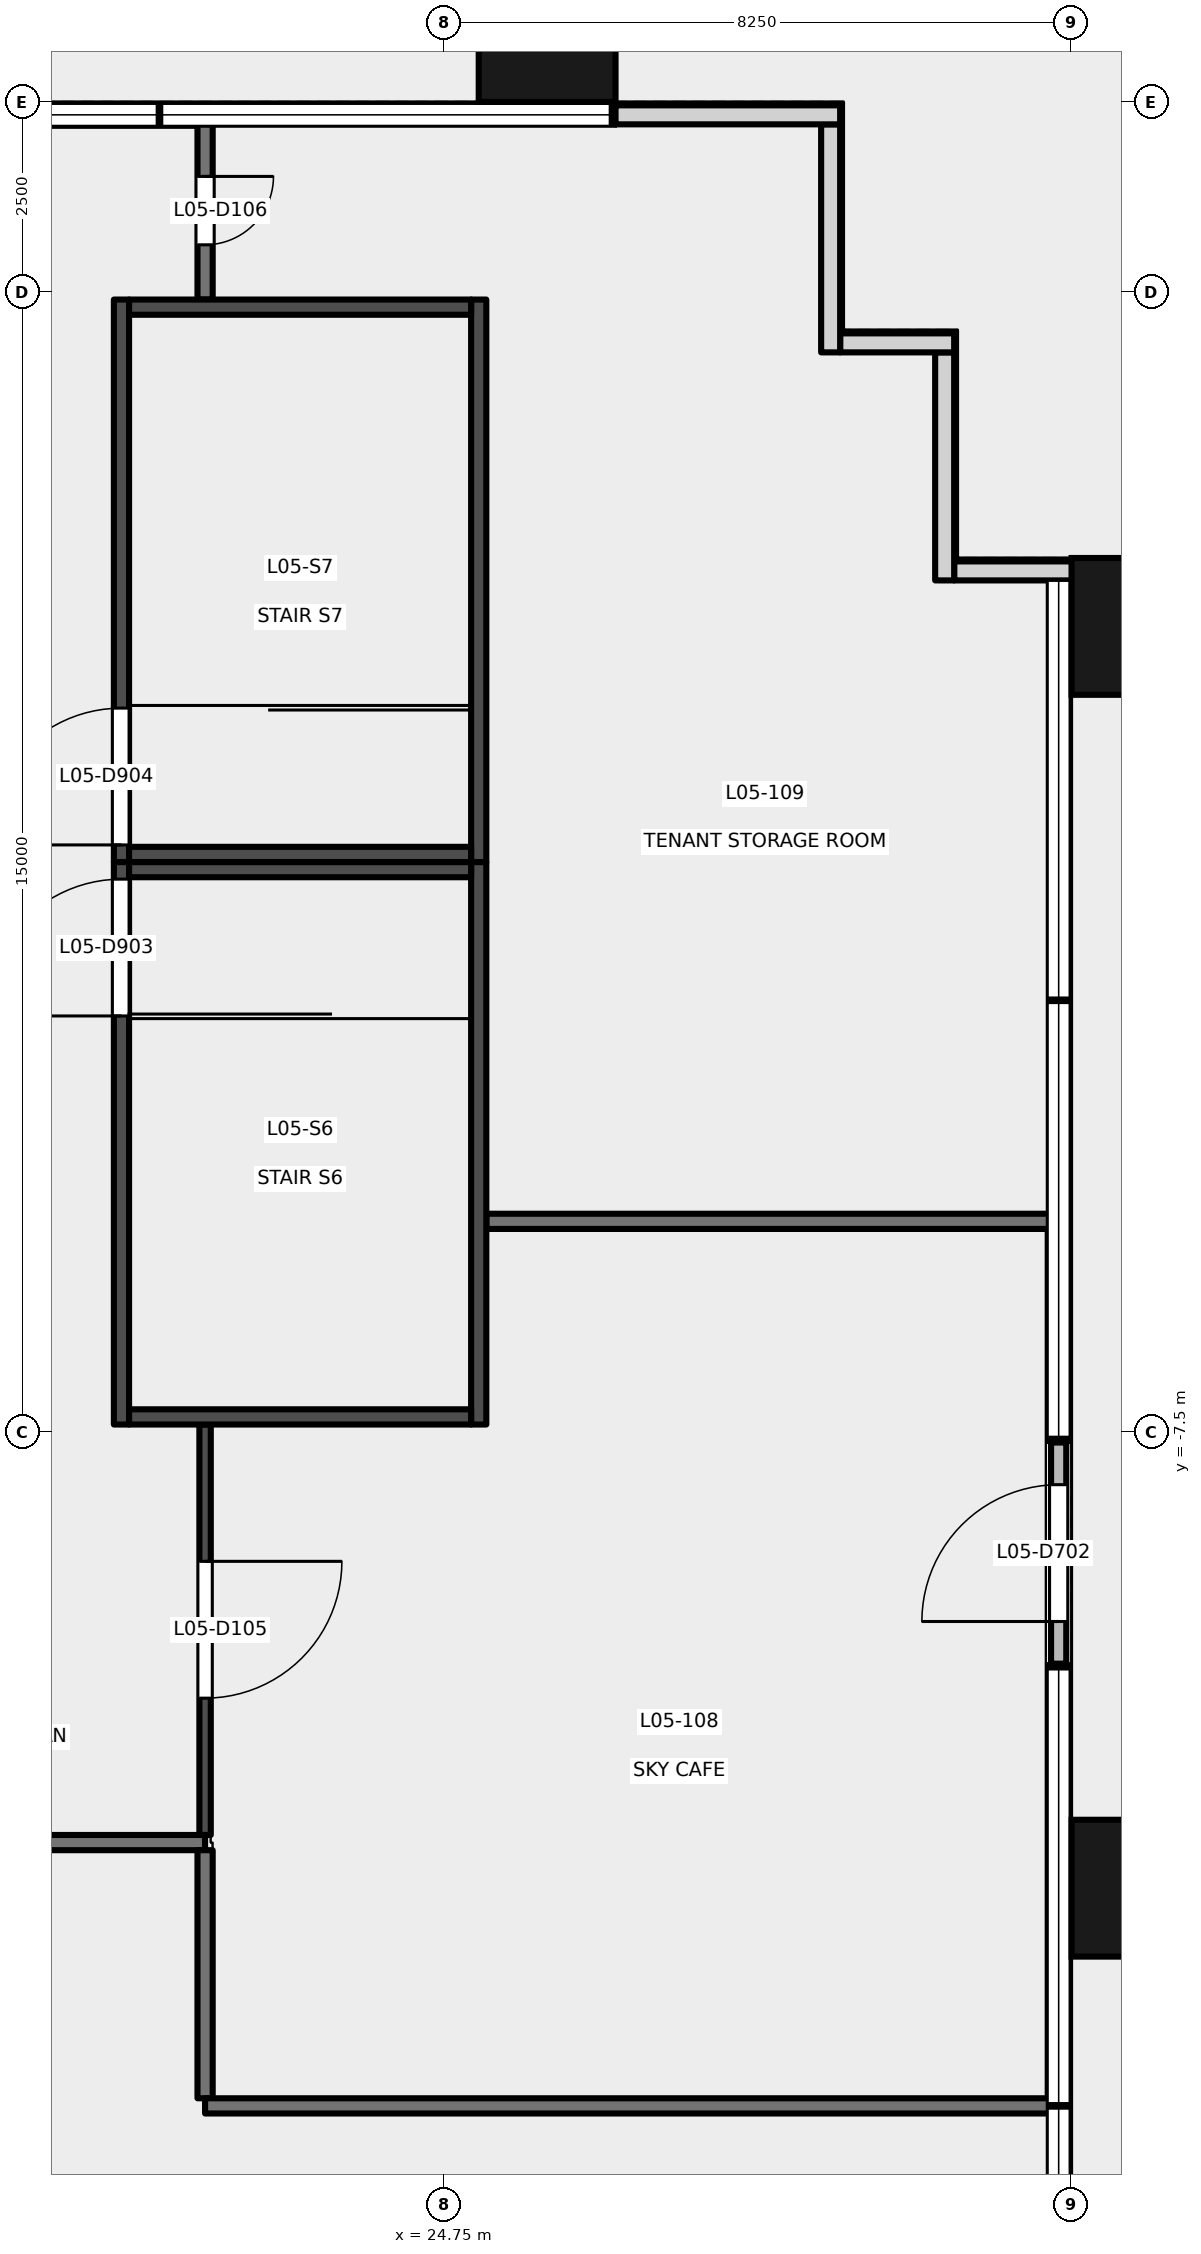
"""IFC4 building model, lengths in metres.
Left out: names, types, materials, properties, quantities, classifications, styles, units other than length and angle.
Written with IfcOpenShell. Run it as: python <this file> out.ifc"""

import sys

from ifc_helpers import new_model, si_unit, direction, frame, frame_2d, origin, origin_2d, place, context, subcontext, project, spatial, rectangle, extrude, element, fill, save


model = new_model("IFC4")
c1 = context("Model", 3, precision=1e-05, world=origin(), true_north=direction((0.0, 1.0)))
c2 = subcontext(c1, "Body", "Model", "MODEL_VIEW")
j1 = project(units=[si_unit("LENGTHUNIT", "METRE"), si_unit("PLANEANGLEUNIT", "RADIAN")], contexts=[c1])
p1 = place(None, origin())
s1 = spatial("IfcSite", under=j1, at=p1, CompositionType="ELEMENT")
p2 = place(p1, origin())
s2 = spatial("IfcBuilding", under=s1, at=p2, CompositionType="ELEMENT")
p3 = place(p2, frame((0.0, 0.0, 27.0)))
s3 = spatial("IfcBuildingStorey", under=s2, at=p3, CompositionType="ELEMENT", Elevation=27.0)
for number, where, z_axis, x_axis in (
    (1, (33.9, -13.5, -0.2), (0.0, 0.0, 1.0), (0.0, 1.0, 0.0)),
    (2, (33.9, 3.1, -0.2), (0.0, 0.0, 1.0), (0.0, 1.0, 0.0)),
    (3, (26.1, 10.9, -0.2), (0.0, 0.0, 1.0), (1.0, 0.0, 0.0)),
):
    element("IfcColumn", number, at=place(p3, frame(where, z_axis=z_axis, x_axis=x_axis)), inside=s3, PredefinedType="COLUMN", context=c2, shape_type="SweptSolid", body=[
        extrude(rectangle(XDim=1.8, YDim=1.8, at=origin_2d()), origin(), (0.0, 0.0, 1.0), 5.4),
    ])
p4 = place(p3, frame((32.83, -10.546, 0.0), z_axis=(0.0, 0.0, 1.0), x_axis=(0.0, 1.0, 0.0)))
e4 = element("IfcWall", 4, at=p4, inside=s3, PredefinedType="SOLIDWALL", context=c2, shape_type="SweptSolid", body=[
    extrude(rectangle(XDim=2.909, YDim=0.2, at=frame_2d((1.455, 0.0))), origin(), (0.0, 0.0, 1.0), 4.1),
])
p5 = place(p4, frame((0.554, 0.0, 0.0)))
e5 = element("IfcOpeningElement", 5, at=p5, cuts=e4, PredefinedType="OPENING", context=c2, shape_type="SweptSolid", body=[
    extrude(rectangle(XDim=1.8, YDim=2.4, at=frame_2d((0.9, 1.2))), frame((0.0, 0.111, 0.0), z_axis=(0.0, -1.0, 0.0), x_axis=(1.0, 0.0, 0.0)), (0.0, 0.0, 1.0), 0.221),
])
p6 = place(p3, frame((33.005, 3.83, 0.0), z_axis=(0.0, 0.0, 1.0), x_axis=(-1.0, 0.0, 0.0)))
e6 = element("IfcWall", 6, at=p6, inside=s3, PredefinedType="SOLIDWALL", context=c2, shape_type="SweptSolid", body=[
    extrude(rectangle(XDim=1.55, YDim=0.25, at=frame_2d((0.775, 0.0))), origin(), (0.0, 0.0, 1.0), 5.2),
])
p7 = place(p3, frame((31.33, 3.705, 0.0), z_axis=(0.0, 0.0, 1.0), x_axis=(0.0, 1.0, 0.0)))
e7 = element("IfcWall", 7, at=p7, inside=s3, PredefinedType="SOLIDWALL", context=c2, shape_type="SweptSolid", body=[
    extrude(rectangle(XDim=3.0, YDim=0.25, at=frame_2d((1.5, 0.0))), origin(), (0.0, 0.0, 1.0), 5.2),
])
p8 = place(p3, frame((31.455, 6.83, 0.0), z_axis=(0.0, 0.0, 1.0), x_axis=(-1.0, 0.0, 0.0)))
e8 = element("IfcWall", 8, at=p8, inside=s3, PredefinedType="SOLIDWALL", context=c2, shape_type="SweptSolid", body=[
    extrude(rectangle(XDim=1.5, YDim=0.25, at=frame_2d((0.75, 0.0))), origin(), (0.0, 0.0, 1.0), 5.2),
])
p9 = place(p3, frame((29.83, 6.705, 0.0), z_axis=(0.0, 0.0, 1.0), x_axis=(0.0, 1.0, 0.0)))
e9 = element("IfcWall", 9, at=p9, inside=s3, PredefinedType="SOLIDWALL", context=c2, shape_type="SweptSolid", body=[
    extrude(rectangle(XDim=3.0, YDim=0.25, at=frame_2d((1.5, 0.0))), origin(), (0.0, 0.0, 1.0), 5.2),
])
p10 = place(p3, frame((29.955, 9.83, 0.0), z_axis=(0.0, 0.0, 1.0), x_axis=(-1.0, 0.0, 0.0)))
e10 = element("IfcWall", 10, at=p10, inside=s3, PredefinedType="SOLIDWALL", context=c2, shape_type="SweptSolid", body=[
    extrude(rectangle(XDim=2.955, YDim=0.25, at=frame_2d((1.478, 0.0))), origin(), (0.0, 0.0, 1.0), 5.2),
])
p11 = place(p3, frame((20.5, -7.4, -0.2), z_axis=(0.0, 0.0, 1.0), x_axis=(0.0, 1.0, 0.0)))
e11 = element("IfcWall", 11, at=p11, inside=s3, PredefinedType="SHEAR", context=c2, shape_type="SweptSolid", body=[
    extrude(rectangle(XDim=7.4, YDim=0.2, at=frame_2d((3.7, 0.0))), origin(), (0.0, 0.0, 1.0), 5.4),
])
p12 = place(p11, frame((5.375, 0.0, 0.2)))
e12 = element("IfcOpeningElement", 12, at=p12, cuts=e11, PredefinedType="OPENING", context=c2, shape_type="SweptSolid", body=[
    extrude(rectangle(XDim=1.8, YDim=2.1, at=frame_2d((0.9, 1.05))), frame((0.0, 0.111, 0.0), z_axis=(0.0, -1.0, 0.0), x_axis=(1.0, 0.0, 0.0)), (0.0, 0.0, 1.0), 0.221),
])
p13 = place(p3, frame((25.2, -7.4, -0.2), z_axis=(0.0, 0.0, 1.0), x_axis=(0.0, 1.0, 0.0)))
e13 = element("IfcWall", 13, at=p13, inside=s3, PredefinedType="SHEAR", context=c2, shape_type="SweptSolid", body=[
    extrude(rectangle(XDim=7.4, YDim=0.2, at=frame_2d((3.7, 0.0))), origin(), (0.0, 0.0, 1.0), 5.4),
])
for number, where, z_axis, x_axis in (
    (14, (20.6, -0.1, -0.2), (0.0, 0.0, 1.0), (1.0, 0.0, 0.0)),
    (15, (20.6, -7.3, -0.2), (0.0, 0.0, 1.0), (1.0, 0.0, 0.0)),
):
    element("IfcWall", number, at=place(p3, frame(where, z_axis=z_axis, x_axis=x_axis)), inside=s3, PredefinedType="SHEAR", context=c2, shape_type="SweptSolid", body=[
        extrude(rectangle(XDim=4.5, YDim=0.2, at=frame_2d((2.25, 0.0))), origin(), (0.0, 0.0, 1.0), 5.4),
    ])
p14 = place(p3, frame((20.5, 0.0, -0.2), z_axis=(0.0, 0.0, 1.0), x_axis=(0.0, 1.0, 0.0)))
e16 = element("IfcWall", 16, at=p14, inside=s3, PredefinedType="SHEAR", context=c2, shape_type="SweptSolid", body=[
    extrude(rectangle(XDim=7.4, YDim=0.2, at=frame_2d((3.7, 0.0))), origin(), (0.0, 0.0, 1.0), 5.4),
])
p15 = place(p14, frame((0.225, 0.0, 0.2)))
e17 = element("IfcOpeningElement", 17, at=p15, cuts=e16, PredefinedType="OPENING", context=c2, shape_type="SweptSolid", body=[
    extrude(rectangle(XDim=1.8, YDim=2.1, at=frame_2d((0.9, 1.05))), frame((0.0, 0.111, 0.0), z_axis=(0.0, -1.0, 0.0), x_axis=(1.0, 0.0, 0.0)), (0.0, 0.0, 1.0), 0.221),
])
p16 = place(p3, frame((25.2, 0.0, -0.2), z_axis=(0.0, 0.0, 1.0), x_axis=(0.0, 1.0, 0.0)))
e18 = element("IfcWall", 18, at=p16, inside=s3, PredefinedType="SHEAR", context=c2, shape_type="SweptSolid", body=[
    extrude(rectangle(XDim=7.4, YDim=0.2, at=frame_2d((3.7, 0.0))), origin(), (0.0, 0.0, 1.0), 5.4),
])
for number, where, z_axis, x_axis in (
    (19, (20.6, 7.3, -0.2), (0.0, 0.0, 1.0), (1.0, 0.0, 0.0)),
    (20, (20.6, 0.1, -0.2), (0.0, 0.0, 1.0), (1.0, 0.0, 0.0)),
):
    element("IfcWall", number, at=place(p3, frame(where, z_axis=z_axis, x_axis=x_axis)), inside=s3, PredefinedType="SHEAR", context=c2, shape_type="SweptSolid", body=[
        extrude(rectangle(XDim=4.5, YDim=0.2, at=frame_2d((2.25, 0.0))), origin(), (0.0, 0.0, 1.0), 5.4),
    ])
p17 = place(p3, frame((21.6, -12.9, 0.0), z_axis=(0.0, 0.0, 1.0), x_axis=(-1.0, 0.0, 0.0)))
e21 = element("IfcWall", 21, at=p17, inside=s3, PredefinedType="PARTITIONING", context=c2, shape_type="SweptSolid", body=[
    extrude(rectangle(XDim=9.5, YDim=0.2, at=frame_2d((4.75, 0.0))), origin(), (0.0, 0.0, 1.0), 3.8),
])
p18 = place(p17, frame((4.3, 0.0, 0.0)))
e22 = element("IfcOpeningElement", 22, at=p18, cuts=e21, PredefinedType="OPENING", context=c2, shape_type="SweptSolid", body=[
    extrude(rectangle(XDim=0.9, YDim=2.1, at=frame_2d((0.45, 1.05))), frame((0.0, 0.111, 0.0), z_axis=(0.0, -1.0, 0.0), x_axis=(1.0, 0.0, 0.0)), (0.0, 0.0, 1.0), 0.221),
])
p19 = place(p3, frame((21.6, -7.4, 0.0), z_axis=(0.0, 0.0, 1.0), x_axis=(0.0, -1.0, 0.0)))
e23 = element("IfcWall", 23, at=p19, inside=s3, PredefinedType="PARTITIONING", context=c2, shape_type="SweptSolid", body=[
    extrude(rectangle(XDim=5.4, YDim=0.15, at=frame_2d((2.7, 0.0))), origin(), (0.0, 0.0, 1.0), 4.6),
])
p20 = place(p19, frame((1.8, 0.0, 0.0)))
e24 = element("IfcOpeningElement", 24, at=p20, cuts=e23, PredefinedType="OPENING", context=c2, shape_type="SweptSolid", body=[
    extrude(rectangle(XDim=1.8, YDim=2.1, at=frame_2d((0.9, 1.05))), frame((0.0, 0.085, 0.0), z_axis=(0.0, -1.0, 0.0), x_axis=(1.0, 0.0, 0.0)), (0.0, 0.0, 1.0), 0.171),
])
p21 = place(p3, frame((21.6, 9.74, 0.0), z_axis=(0.0, 0.0, 1.0), x_axis=(0.0, -1.0, 0.0)))
e25 = element("IfcWall", 25, at=p21, inside=s3, PredefinedType="PARTITIONING", context=c2, shape_type="SweptSolid", body=[
    extrude(rectangle(XDim=2.34, YDim=0.2, at=frame_2d((1.17, 0.0))), origin(), (0.0, 0.0, 1.0), 5.2),
])
p22 = place(p21, frame((0.72, 0.0, 0.0)))
e26 = element("IfcOpeningElement", 26, at=p22, cuts=e25, PredefinedType="OPENING", context=c2, shape_type="SweptSolid", body=[
    extrude(rectangle(XDim=0.9, YDim=2.1, at=frame_2d((0.45, 1.05))), frame((0.0, 0.111, 0.0), z_axis=(0.0, -1.0, 0.0), x_axis=(1.0, 0.0, 0.0)), (0.0, 0.0, 1.0), 0.221),
])
p23 = place(p3, frame((21.6, -13.0, 0.0), z_axis=(0.0, 0.0, 1.0), x_axis=(0.0, -1.0, 0.0)))
e27 = element("IfcWall", 27, at=p23, inside=s3, PredefinedType="PARTITIONING", context=c2, shape_type="SweptSolid", body=[
    extrude(rectangle(XDim=3.264, YDim=0.2, at=frame_2d((1.632, 0.0))), origin(), (0.0, 0.0, 1.0), 4.6),
])
p24 = place(p3, frame((21.6, -16.364, 0.0), z_axis=(0.0, 0.0, 1.0), x_axis=(1.0, 0.0, 0.0)))
e28 = element("IfcWall", 28, at=p24, inside=s3, PredefinedType="PARTITIONING", context=c2, shape_type="SweptSolid", body=[
    extrude(rectangle(XDim=11.14, YDim=0.2, at=frame_2d((5.57, 0.0))), origin(), (0.0, 0.0, 1.0), 5.2),
])
p25 = place(p3, frame((25.3, -4.727, 0.0), z_axis=(0.0, 0.0, 1.0), x_axis=(1.0, 0.0, 0.0)))
e29 = element("IfcWall", 29, at=p25, inside=s3, PredefinedType="PARTITIONING", context=c2, shape_type="SweptSolid", body=[
    extrude(rectangle(XDim=7.44, YDim=0.2, at=frame_2d((3.72, 0.0))), origin(), (0.0, 0.0, 1.0), 4.6),
])
p26 = place(p5, origin())
e30 = element("IfcDoor", 30, at=p26, inside=s3, OperationType="DOUBLE_DOOR_SINGLE_SWING", PredefinedType="DOOR", context=c2, shape_type="SweptSolid", body=[
    extrude(rectangle(XDim=1.8, YDim=2.4, at=frame_2d((0.9, 1.2))), frame((0.0, 0.025, 0.0), z_axis=(0.0, -1.0, 0.0), x_axis=(1.0, 0.0, 0.0)), (0.0, 0.0, 1.0), 0.05),
])
fill(e5, e30)
p27 = place(p12, origin())
e31 = element("IfcDoor", 31, at=p27, inside=s3, OperationType="DOUBLE_DOOR_SINGLE_SWING", PredefinedType="DOOR", context=c2, shape_type="SweptSolid", body=[
    extrude(rectangle(XDim=1.8, YDim=2.1, at=frame_2d((0.9, 1.05))), frame((0.0, 0.025, 0.0), z_axis=(0.0, -1.0, 0.0), x_axis=(1.0, 0.0, 0.0)), (0.0, 0.0, 1.0), 0.05),
])
fill(e12, e31)
p28 = place(p15, origin())
e32 = element("IfcDoor", 32, at=p28, inside=s3, OperationType="DOUBLE_DOOR_SINGLE_SWING", PredefinedType="DOOR", context=c2, shape_type="SweptSolid", body=[
    extrude(rectangle(XDim=1.8, YDim=2.1, at=frame_2d((0.9, 1.05))), frame((0.0, 0.025, 0.0), z_axis=(0.0, -1.0, 0.0), x_axis=(1.0, 0.0, 0.0)), (0.0, 0.0, 1.0), 0.05),
])
fill(e17, e32)
p29 = place(p20, origin())
e33 = element("IfcDoor", 33, at=p29, inside=s3, OperationType="DOUBLE_DOOR_SINGLE_SWING", PredefinedType="DOOR", context=c2, shape_type="SweptSolid", body=[
    extrude(rectangle(XDim=1.8, YDim=2.1, at=frame_2d((0.9, 1.05))), frame((0.0, 0.025, 0.0), z_axis=(0.0, -1.0, 0.0), x_axis=(1.0, 0.0, 0.0)), (0.0, 0.0, 1.0), 0.05),
])
fill(e24, e33)
p30 = place(p22, origin())
e34 = element("IfcDoor", 34, at=p30, inside=s3, OperationType="SINGLE_SWING_LEFT", PredefinedType="DOOR", context=c2, shape_type="SweptSolid", body=[
    extrude(rectangle(XDim=0.9, YDim=2.1, at=frame_2d((0.45, 1.05))), frame((0.0, 0.025, 0.0), z_axis=(0.0, -1.0, 0.0), x_axis=(1.0, 0.0, 0.0)), (0.0, 0.0, 1.0), 0.05),
])
fill(e26, e34)
save(model, sys.argv[1])
